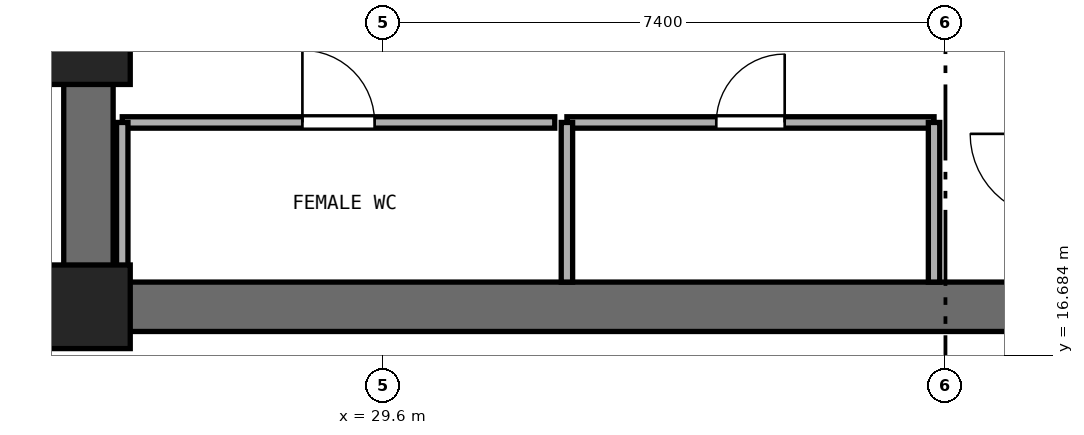
"""IFC4 building model, lengths in metres.
Left out: names, types, materials, properties, quantities, classifications, styles, units other than length and angle.
Written with IfcOpenShell. Run it as: python <this file> out.ifc"""

import sys

from ifc_helpers import new_model, si_unit, direction, frame, frame_2d, origin, origin_2d, place, context, subcontext, project, spatial, rectangle, extrude, element, fill, save


model = new_model("IFC4")
c1 = context("Model", 3, precision=1e-05, world=origin(), true_north=direction((0.0, 1.0)))
c2 = subcontext(c1, "Body", "Model", "MODEL_VIEW")
j1 = project(units=[si_unit("LENGTHUNIT", "METRE"), si_unit("PLANEANGLEUNIT", "RADIAN")], contexts=[c1])
p1 = place(None, origin())
s1 = spatial("IfcSite", under=j1, at=p1, CompositionType="ELEMENT")
p2 = place(p1, origin())
s2 = spatial("IfcBuilding", under=s1, at=p2, CompositionType="ELEMENT")
p3 = place(p2, frame((0.0, 0.0, 44.0)))
s3 = spatial("IfcBuildingStorey", under=s2, at=p3, CompositionType="ELEMENT", Elevation=44.0)
p4 = place(p3, frame((25.4, 17.325, 0.0), z_axis=(0.0, 0.0, 1.0), x_axis=(1.0, 0.0, 0.0)))
e1 = element("IfcWall", 1, at=p4, inside=s3, PredefinedType="SHEAR", context=c2, shape_type="SweptSolid", body=[
    extrude(rectangle(XDim=23.2, YDim=0.65, at=frame_2d((11.6, 0.0))), origin(), (0.0, 0.0, 1.0), 3.525),
])
p5 = place(p3, frame((25.725, 17.65, 0.0), z_axis=(0.0, 0.0, 1.0), x_axis=(0.0, 1.0, 0.0)))
e2 = element("IfcWall", 2, at=p5, inside=s3, PredefinedType="SHEAR", context=c2, shape_type="SweptSolid", body=[
    extrude(rectangle(XDim=15.1, YDim=0.65, at=frame_2d((7.55, 0.0))), origin(), (0.0, 0.0, 1.0), 3.525),
])
p6 = place(p5, frame((6.8, 0.0, 0.0)))
e3 = element("IfcOpeningElement", 3, at=p6, cuts=e2, PredefinedType="OPENING", context=c2, shape_type="SweptSolid", body=[
    extrude(rectangle(XDim=1.5, YDim=2.15, at=frame_2d((0.75, 1.075))), frame((0.0, 0.335, 0.0), z_axis=(0.0, -1.0, 0.0), x_axis=(1.0, 0.0, 0.0)), (0.0, 0.0, 1.0), 0.67),
])
for number, where, z_axis, x_axis in (
    (4, (25.725, 17.325, 0.0), (0.0, 0.0, 1.0), (1.0, 0.0, 0.0)),
    (5, (25.725, 20.8, 0.0), (0.0, 0.0, 1.0), (1.0, 0.0, 0.0)),
):
    element("IfcColumn", number, at=place(p3, frame(where, z_axis=z_axis, x_axis=x_axis)), inside=s3, PredefinedType="PILASTER", context=c2, shape_type="SweptSolid", body=[
        extrude(rectangle(XDim=1.1, YDim=1.1, at=origin_2d()), origin(), (0.0, 0.0, 1.0), 3.8),
    ])
p7 = place(p3, frame((26.17, 19.75, 0.0), z_axis=(0.0, 0.0, 1.0), x_axis=(1.0, 0.0, 0.0)))
e6 = element("IfcWall", 6, at=p7, inside=s3, PredefinedType="PARTITIONING", context=c2, shape_type="SweptSolid", body=[
    extrude(rectangle(XDim=5.69, YDim=0.15, at=frame_2d((2.845, 0.0))), origin(), (0.0, 0.0, 1.0), 3.525),
])
p8 = place(p7, frame((2.37, 0.0, 0.0)))
e7 = element("IfcOpeningElement", 7, at=p8, cuts=e6, PredefinedType="OPENING", context=c2, shape_type="SweptSolid", body=[
    extrude(rectangle(XDim=0.95, YDim=2.1, at=frame_2d((0.475, 1.05))), frame((0.0, 0.085, 0.0), z_axis=(0.0, -1.0, 0.0), x_axis=(1.0, 0.0, 0.0)), (0.0, 0.0, 1.0), 0.17),
])
p9 = place(p3, frame((26.17, 17.65, 0.0), z_axis=(0.0, 0.0, 1.0), x_axis=(0.0, 1.0, 0.0)))
e8 = element("IfcWall", 8, at=p9, inside=s3, PredefinedType="PARTITIONING", context=c2, shape_type="SweptSolid", body=[
    extrude(rectangle(XDim=2.1, YDim=0.15, at=frame_2d((1.05, 0.0))), origin(), (0.0, 0.0, 1.0), 3.525),
])
p10 = place(p3, frame((32.02, 19.75, 0.0), z_axis=(0.0, 0.0, 1.0), x_axis=(1.0, 0.0, 0.0)))
e9 = element("IfcWall", 9, at=p10, inside=s3, PredefinedType="PARTITIONING", context=c2, shape_type="SweptSolid", body=[
    extrude(rectangle(XDim=4.83, YDim=0.15, at=frame_2d((2.415, 0.0))), origin(), (0.0, 0.0, 1.0), 3.525),
])
p11 = place(p10, frame((1.965, 0.0, 0.0)))
e10 = element("IfcOpeningElement", 10, at=p11, cuts=e9, PredefinedType="OPENING", context=c2, shape_type="SweptSolid", body=[
    extrude(rectangle(XDim=0.9, YDim=2.1, at=frame_2d((0.45, 1.05))), frame((0.0, 0.085, 0.0), z_axis=(0.0, -1.0, 0.0), x_axis=(1.0, 0.0, 0.0)), (0.0, 0.0, 1.0), 0.17),
])
for number, where, z_axis, x_axis in (
    (11, (32.02, 17.65, 0.0), (0.0, 0.0, 1.0), (0.0, 1.0, 0.0)),
    (12, (36.85, 17.65, 0.0), (0.0, 0.0, 1.0), (0.0, 1.0, 0.0)),
):
    element("IfcWall", number, at=place(p3, frame(where, z_axis=z_axis, x_axis=x_axis)), inside=s3, PredefinedType="PARTITIONING", context=c2, shape_type="SweptSolid", body=[
        extrude(rectangle(XDim=2.1, YDim=0.15, at=frame_2d((1.05, 0.0))), origin(), (0.0, 0.0, 1.0), 3.525),
    ])
p12 = place(p8, origin())
e13 = element("IfcDoor", 13, at=p12, inside=s3, OperationType="SINGLE_SWING_LEFT", PredefinedType="DOOR", context=c2, shape_type="SweptSolid", body=[
    extrude(rectangle(XDim=0.95, YDim=2.1, at=frame_2d((0.475, 1.05))), frame((0.0, 0.025, 0.0), z_axis=(0.0, -1.0, 0.0), x_axis=(1.0, 0.0, 0.0)), (0.0, 0.0, 1.0), 0.05),
])
fill(e7, e13)
p13 = place(p11, origin())
e14 = element("IfcDoor", 14, at=p13, inside=s3, OperationType="SINGLE_SWING_RIGHT", PredefinedType="DOOR", context=c2, shape_type="SweptSolid", body=[
    extrude(rectangle(XDim=0.9, YDim=2.1, at=frame_2d((0.45, 1.05))), frame((0.0, 0.025, 0.0), z_axis=(0.0, -1.0, 0.0), x_axis=(1.0, 0.0, 0.0)), (0.0, 0.0, 1.0), 0.05),
])
fill(e10, e14)
save(model, sys.argv[1])
